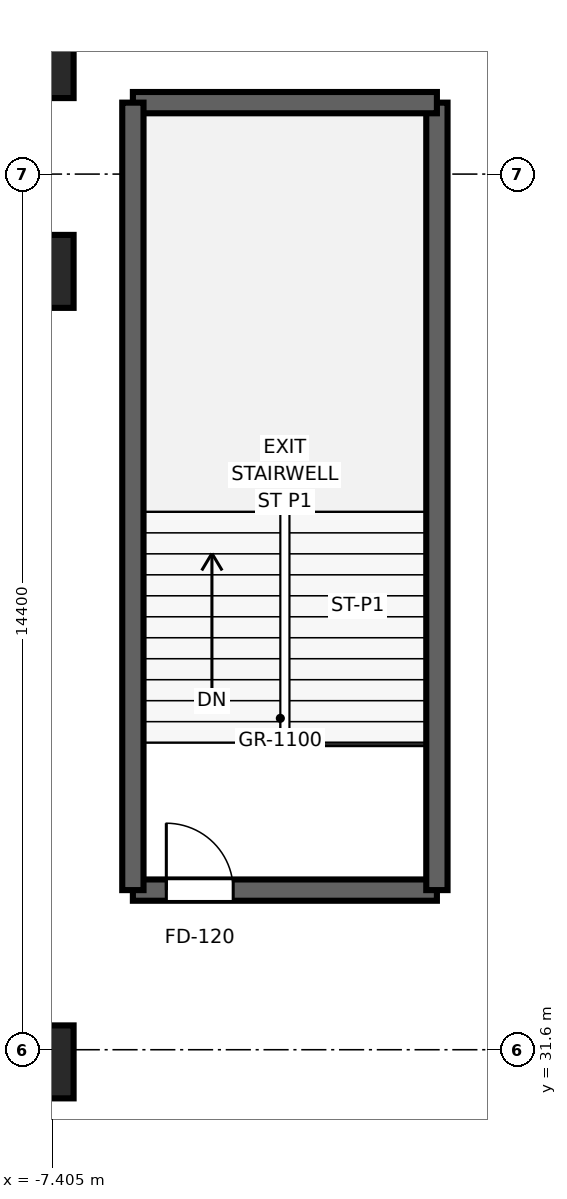
"""IFC4 building model, lengths in metres.
Left out: names, types, materials, properties, quantities, classifications, styles, units other than length and angle.
Written with IfcOpenShell. Run it as: python <this file> out.ifc"""

import sys

from ifc_helpers import new_model, si_unit, direction, frame, frame_2d, origin, origin_2d, place, context, subcontext, project, spatial, rectangle, extrude, source, transform, mapped, element, fill, save


model = new_model("IFC4")
c1 = context("Model", 3, precision=1e-05, world=origin(), true_north=direction((0.0, 1.0)))
c2 = subcontext(c1, "Body", "Model", "MODEL_VIEW")
j1 = project(units=[si_unit("LENGTHUNIT", "METRE"), si_unit("PLANEANGLEUNIT", "RADIAN")], contexts=[c1])
p1 = place(None, origin())
s1 = spatial("IfcSite", under=j1, at=p1, CompositionType="ELEMENT")
p2 = place(p1, origin())
s2 = spatial("IfcBuilding", under=s1, at=p2, CompositionType="ELEMENT")
p3 = place(p2, frame((0.0, 0.0, 26.8)))
s3 = spatial("IfcBuildingStorey", under=s2, at=p3, CompositionType="ELEMENT", Elevation=26.8)
p4 = place(p3, frame((-6.075, 34.225, 0.0), z_axis=(0.0, 0.0, 1.0), x_axis=(1.0, 0.0, 0.0)))
e1 = element("IfcWall", 1, at=p4, inside=s3, PredefinedType="SHEAR", context=c2, shape_type="SweptSolid", body=[
    extrude(rectangle(XDim=5.0, YDim=0.35, at=frame_2d((2.5, 0.0))), origin(), (0.0, 0.0, 1.0), 5.2),
])
p5 = place(p4, frame((0.55, 0.0, 0.0)))
e2 = element("IfcOpeningElement", 2, at=p5, cuts=e1, PredefinedType="OPENING", context=c2, shape_type="SweptSolid", body=[
    extrude(rectangle(XDim=1.1, YDim=2.12, at=frame_2d((0.55, 1.06))), frame((0.0, 0.185, 0.0), z_axis=(0.0, -1.0, 0.0), x_axis=(1.0, 0.0, 0.0)), (0.0, 0.0, 1.0), 0.37),
])
p6 = place(p3, frame((-1.075, 34.225, 0.0), z_axis=(0.0, 0.0, 1.0), x_axis=(0.0, 1.0, 0.0)))
e3 = element("IfcWall", 3, at=p6, inside=s3, PredefinedType="SHEAR", context=c2, shape_type="SweptSolid", body=[
    extrude(rectangle(XDim=12.95, YDim=0.35, at=frame_2d((6.475, 0.0))), origin(), (0.0, 0.0, 1.0), 5.2),
])
p7 = place(p3, frame((-1.075, 47.175, 0.0), z_axis=(0.0, 0.0, 1.0), x_axis=(-1.0, 0.0, 0.0)))
e4 = element("IfcWall", 4, at=p7, inside=s3, PredefinedType="SHEAR", context=c2, shape_type="SweptSolid", body=[
    extrude(rectangle(XDim=5.0, YDim=0.35, at=frame_2d((2.5, 0.0))), origin(), (0.0, 0.0, 1.0), 5.2),
])
p8 = place(p3, frame((-6.075, 47.175, 0.0), z_axis=(0.0, 0.0, 1.0), x_axis=(0.0, -1.0, 0.0)))
e5 = element("IfcWall", 5, at=p8, inside=s3, PredefinedType="SHEAR", context=c2, shape_type="SweptSolid", body=[
    extrude(rectangle(XDim=12.95, YDim=0.35, at=frame_2d((6.475, 0.0))), origin(), (0.0, 0.0, 1.0), 5.2),
])
m1 = source(origin(), c2, "Body", "SweptSolid", [
    extrude(rectangle(XDim=1.2, YDim=1.2, at=origin_2d()), origin(), (0.0, 0.0, 1.0), 5.2),
])
for number, where, z_axis, x_axis in (
    (6, (-7.65, 31.4, 0.0), (0.0, 0.0, 1.0), (1.0, 0.0, 0.0)),
    (7, (-7.65, 44.4, 0.0), (0.0, 0.0, 1.0), (1.0, 0.0, 0.0)),
    (8, (-7.65, 47.85, 0.0), (0.0, 0.0, 1.0), (1.0, 0.0, 0.0)),
):
    element("IfcColumn", number, at=place(p3, frame(where, z_axis=z_axis, x_axis=x_axis)), inside=s3, PredefinedType="COLUMN", context=c2, shape_type="MappedRepresentation", body=[
        mapped(m1, transform((0.0, 0.0, 0.0), x_axis=(1.0, 0.0, 0.0), y_axis=(0.0, 1.0, 0.0), z_axis=(0.0, 0.0, 1.0), scale=1.0)),
    ])
m2 = source(origin(), c2, "Body", "SweptSolid", [
    extrude(rectangle(XDim=1.1, YDim=2.12, at=frame_2d((0.55, 1.06))), frame((0.0, 0.025, 0.0), z_axis=(0.0, -1.0, 0.0), x_axis=(1.0, 0.0, 0.0)), (0.0, 0.0, 1.0), 0.05),
])
p9 = place(p5, origin())
e9 = element("IfcDoor", 9, at=p9, inside=s3, OperationType="SINGLE_SWING_LEFT", PredefinedType="DOOR", context=c2, shape_type="MappedRepresentation", body=[
    mapped(m2, transform((0.0, 0.0, 0.0), x_axis=(1.0, 0.0, 0.0), y_axis=(0.0, 1.0, 0.0), z_axis=(0.0, 0.0, 1.0), scale=1.0)),
])
fill(e2, e9)
save(model, sys.argv[1])
